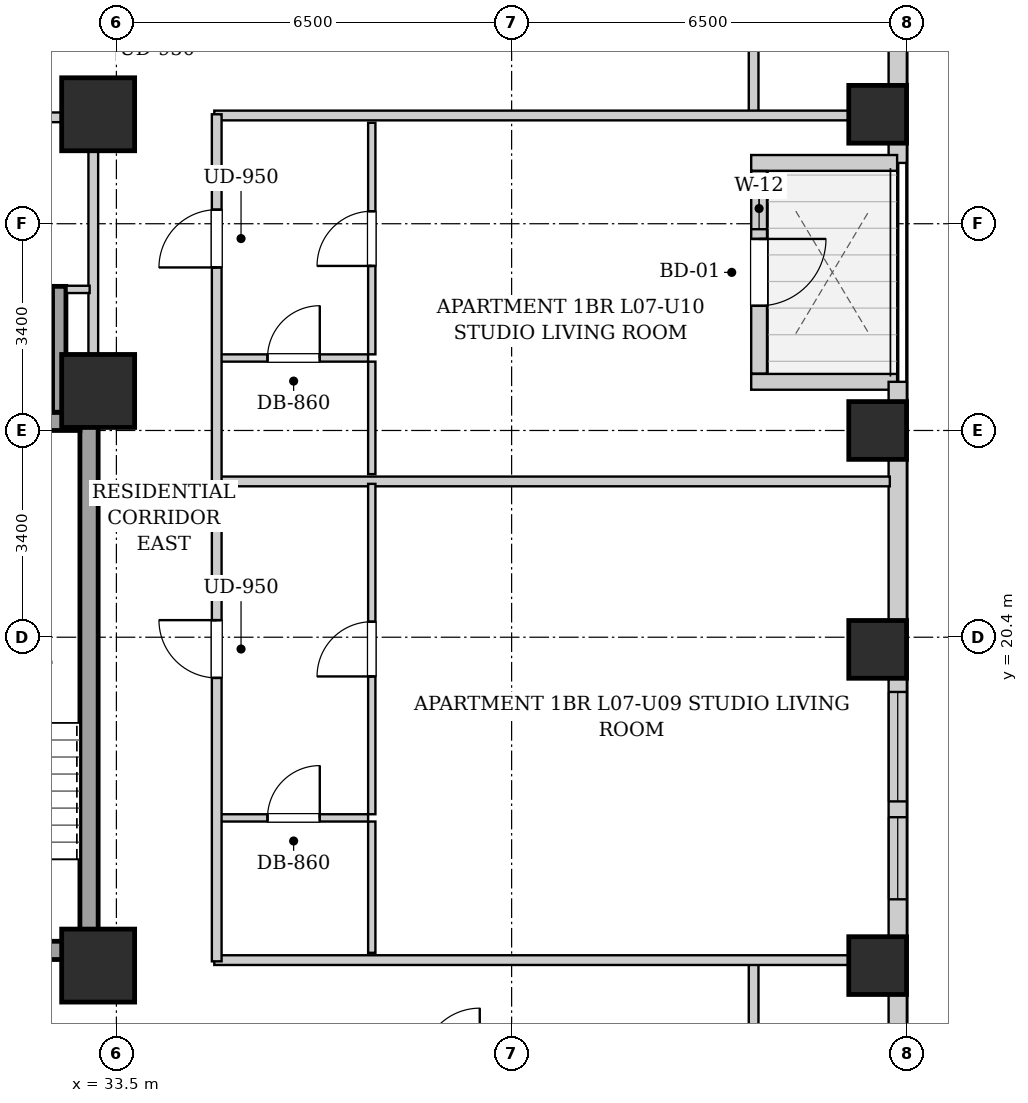
"""IFC4 building model, lengths in metres.
Left out: names, types, materials, properties, quantities, classifications, styles, units other than length and angle.
Written with IfcOpenShell. Run it as: python <this file> out.ifc"""

import sys

from ifc_helpers import new_model, si_unit, direction, frame, frame_2d, origin, origin_2d, place, context, subcontext, project, spatial, rectangle, extrude, element, fill, save


model = new_model("IFC4")
c1 = context("Model", 3, precision=1e-05, world=origin(), true_north=direction((0.0, 1.0)))
c2 = subcontext(c1, "Body", "Model", "MODEL_VIEW")
j1 = project(units=[si_unit("LENGTHUNIT", "METRE"), si_unit("PLANEANGLEUNIT", "RADIAN")], contexts=[c1])
p1 = place(None, origin())
s1 = spatial("IfcSite", under=j1, at=p1, CompositionType="ELEMENT")
p2 = place(p1, origin())
s2 = spatial("IfcBuilding", under=s1, at=p2, CompositionType="ELEMENT")
p3 = place(p2, frame((0.0, 0.0, 32.2)))
s3 = spatial("IfcBuildingStorey", under=s2, at=p3, CompositionType="ELEMENT", Elevation=32.2)
for number, where, z_axis, x_axis in (
    (1, (46.02, 15.0, 0.0), (0.0, 0.0, 1.0), (1.0, 0.0, 0.0)),
    (2, (46.02, 20.2, 0.0), (0.0, 0.0, 1.0), (1.0, 0.0, 0.0)),
    (3, (46.02, 23.8, 0.0), (0.0, 0.0, 1.0), (1.0, 0.0, 0.0)),
    (4, (46.02, 29.0, 0.0), (0.0, 0.0, 1.0), (1.0, 0.0, 0.0)),
):
    element("IfcColumn", number, at=place(p3, frame(where, z_axis=z_axis, x_axis=x_axis)), inside=s3, PredefinedType="COLUMN", context=c2, shape_type="SweptSolid", body=[
        extrude(rectangle(XDim=0.95, YDim=0.95, at=origin_2d()), origin(), (0.0, 0.0, 1.0), 3.2),
    ])
for number, where, z_axis, x_axis in (
    (5, (33.2, 15.0, 0.0), (0.0, 0.0, 1.0), (1.0, 0.0, 0.0)),
    (6, (33.2, 29.0, 0.0), (0.0, 0.0, 1.0), (1.0, 0.0, 0.0)),
    (7, (33.2, 24.45, 0.0), (0.0, 0.0, 1.0), (1.0, 0.0, 0.0)),
):
    element("IfcColumn", number, at=place(p3, frame(where, z_axis=z_axis, x_axis=x_axis)), inside=s3, PredefinedType="COLUMN", context=c2, shape_type="SweptSolid", body=[
        extrude(rectangle(XDim=1.2, YDim=1.2, at=origin_2d()), origin(), (0.0, 0.0, 1.0), 3.2),
    ])
p4 = place(p3, frame((46.35, 45.1, 0.0), z_axis=(0.0, 0.0, 1.0), x_axis=(0.0, -1.0, 0.0)))
e8 = element("IfcWall", 8, at=p4, inside=s3, PredefinedType="SOLIDWALL", context=c2, shape_type="SweptSolid", body=[
    extrude(rectangle(XDim=16.9, YDim=0.3, at=frame_2d((8.45, 0.0))), origin(), (0.0, 0.0, 1.0), 1.975),
])
p5 = place(p4, frame((3.665, 0.0, 0.55)))
e9 = element("IfcOpeningElement", 9, at=p5, cuts=e8, PredefinedType="OPENING", context=c2, shape_type="SweptSolid", body=[
    extrude(rectangle(XDim=1.8, YDim=1.2, at=frame_2d((0.9, 0.6))), frame((0.0, 0.16, 0.0), z_axis=(0.0, -1.0, 0.0), x_axis=(1.0, 0.0, 0.0)), (0.0, 0.0, 1.0), 0.32),
])
p6 = place(p4, frame((1.185, 0.0, 0.55)))
e10 = element("IfcOpeningElement", 10, at=p6, cuts=e8, PredefinedType="OPENING", context=c2, shape_type="SweptSolid", body=[
    extrude(rectangle(XDim=1.35, YDim=1.2, at=frame_2d((0.675, 0.6))), frame((0.0, 0.16, 0.0), z_axis=(0.0, -1.0, 0.0), x_axis=(1.0, 0.0, 0.0)), (0.0, 0.0, 1.0), 0.32),
])
p7 = place(p3, frame((46.34, 28.2, 0.0), z_axis=(0.0, 0.0, 1.0), x_axis=(-1.0, 0.0, 0.0)))
e11 = element("IfcWall", 11, at=p7, inside=s3, PredefinedType="SOLIDWALL", context=c2, shape_type="SweptSolid", body=[
    extrude(rectangle(XDim=2.4, YDim=0.26, at=frame_2d((1.2, 0.0))), origin(), (0.0, 0.0, 1.0), 2.94),
])
p8 = place(p3, frame((44.07, 28.066, 0.0), z_axis=(0.0, 0.0, 1.0), x_axis=(0.0, -1.0, 0.0)))
e12 = element("IfcWall", 12, at=p8, inside=s3, PredefinedType="SOLIDWALL", context=c2, shape_type="SweptSolid", body=[
    extrude(rectangle(XDim=3.332, YDim=0.26, at=frame_2d((1.666, 0.0))), origin(), (0.0, 0.0, 1.0), 2.94),
])
p9 = place(p8, frame((1.116, 0.0, 0.0)))
e13 = element("IfcOpeningElement", 13, at=p9, cuts=e12, PredefinedType="OPENING", context=c2, shape_type="SweptSolid", body=[
    extrude(rectangle(XDim=1.1, YDim=2.0, at=frame_2d((0.55, 1.0))), frame((0.0, 0.14, 0.0), z_axis=(0.0, -1.0, 0.0), x_axis=(1.0, 0.0, 0.0)), (0.0, 0.0, 1.0), 0.28),
])
p10 = place(p8, frame((0.276, 0.0, 0.55)))
e14 = element("IfcOpeningElement", 14, at=p10, cuts=e12, PredefinedType="OPENING", context=c2, shape_type="SweptSolid", body=[
    extrude(rectangle(XDim=0.68, YDim=1.2, at=frame_2d((0.34, 0.6))), frame((0.0, 0.14, 0.0), z_axis=(0.0, -1.0, 0.0), x_axis=(1.0, 0.0, 0.0)), (0.0, 0.0, 1.0), 0.28),
])
p11 = place(p3, frame((43.94, 24.6, 0.0), z_axis=(0.0, 0.0, 1.0), x_axis=(1.0, 0.0, 0.0)))
e15 = element("IfcWall", 15, at=p11, inside=s3, PredefinedType="SOLIDWALL", context=c2, shape_type="SweptSolid", body=[
    extrude(rectangle(XDim=2.4, YDim=0.26, at=frame_2d((1.2, 0.0))), origin(), (0.0, 0.0, 1.0), 2.94),
])
p12 = place(p3, frame((46.35, 24.6, 0.0), z_axis=(0.0, 0.0, 1.0), x_axis=(0.0, -1.0, 0.0)))
e16 = element("IfcWall", 16, at=p12, inside=s3, PredefinedType="SOLIDWALL", context=c2, shape_type="SweptSolid", body=[
    extrude(rectangle(XDim=22.1, YDim=0.3, at=frame_2d((11.05, 0.0))), origin(), (0.0, 0.0, 1.0), 1.975),
])
p13 = place(p12, frame((17.141, 0.0, 0.55)))
e17 = element("IfcOpeningElement", 17, at=p13, cuts=e16, PredefinedType="OPENING", context=c2, shape_type="SweptSolid", body=[
    extrude(rectangle(XDim=1.8, YDim=1.2, at=frame_2d((0.9, 0.6))), frame((0.0, 0.16, 0.0), z_axis=(0.0, -1.0, 0.0), x_axis=(1.0, 0.0, 0.0)), (0.0, 0.0, 1.0), 0.32),
])
p14 = place(p12, frame((14.415, 0.0, 0.55)))
e18 = element("IfcOpeningElement", 18, at=p14, cuts=e16, PredefinedType="OPENING", context=c2, shape_type="SweptSolid", body=[
    extrude(rectangle(XDim=1.35, YDim=1.2, at=frame_2d((0.675, 0.6))), frame((0.0, 0.16, 0.0), z_axis=(0.0, -1.0, 0.0), x_axis=(1.0, 0.0, 0.0)), (0.0, 0.0, 1.0), 0.32),
])
p15 = place(p12, frame((5.1, 0.0, 0.55)))
e19 = element("IfcOpeningElement", 19, at=p15, cuts=e16, PredefinedType="OPENING", context=c2, shape_type="SweptSolid", body=[
    extrude(rectangle(XDim=1.8, YDim=1.2, at=frame_2d((0.9, 0.6))), frame((0.0, 0.16, 0.0), z_axis=(0.0, -1.0, 0.0), x_axis=(1.0, 0.0, 0.0)), (0.0, 0.0, 1.0), 0.32),
])
p16 = place(p12, frame((7.16, 0.0, 0.55)))
e20 = element("IfcOpeningElement", 20, at=p16, cuts=e16, PredefinedType="OPENING", context=c2, shape_type="SweptSolid", body=[
    extrude(rectangle(XDim=1.35, YDim=1.2, at=frame_2d((0.675, 0.6))), frame((0.0, 0.16, 0.0), z_axis=(0.0, -1.0, 0.0), x_axis=(1.0, 0.0, 0.0)), (0.0, 0.0, 1.0), 0.32),
])
p17 = place(p3, frame((33.05, 15.1, 0.0), z_axis=(0.0, 0.0, 1.0), x_axis=(0.0, 1.0, 0.0)))
e21 = element("IfcWall", 21, at=p17, inside=s3, PredefinedType="SHEAR", context=c2, shape_type="SweptSolid", body=[
    extrude(rectangle(XDim=9.0, YDim=0.3, at=frame_2d((4.5, 0.0))), origin(), (0.0, 0.0, 1.0), 2.94),
])
p18 = place(p3, frame((30.05, 23.95, 0.0), z_axis=(0.0, 0.0, 1.0), x_axis=(1.0, 0.0, 0.0)))
e22 = element("IfcWall", 22, at=p18, inside=s3, PredefinedType="SHEAR", context=c2, shape_type="SweptSolid", body=[
    extrude(rectangle(XDim=2.85, YDim=0.3, at=frame_2d((1.425, 0.0))), origin(), (0.0, 0.0, 1.0), 2.94),
])
p19 = place(p3, frame((30.05, 15.25, 0.0), z_axis=(0.0, 0.0, 1.0), x_axis=(1.0, 0.0, 0.0)))
e23 = element("IfcWall", 23, at=p19, inside=s3, PredefinedType="SHEAR", context=c2, shape_type="SweptSolid", body=[
    extrude(rectangle(XDim=2.85, YDim=0.3, at=frame_2d((1.425, 0.0))), origin(), (0.0, 0.0, 1.0), 2.94),
])
p20 = place(p19, frame((0.86, 0.0, 0.0)))
e24 = element("IfcOpeningElement", 24, at=p20, cuts=e23, PredefinedType="OPENING", context=c2, shape_type="SweptSolid", body=[
    extrude(rectangle(XDim=1.1, YDim=2.05, at=frame_2d((0.55, 1.025))), frame((0.0, 0.16, 0.0), z_axis=(0.0, -1.0, 0.0), x_axis=(1.0, 0.0, 0.0)), (0.0, 0.0, 1.0), 0.32),
])
p21 = place(p3, frame((32.56, 24.1, 0.0), z_axis=(0.0, 0.0, 1.0), x_axis=(0.0, 1.0, 0.0)))
e25 = element("IfcWall", 25, at=p21, inside=s3, PredefinedType="SHEAR", context=c2, shape_type="SweptSolid", body=[
    extrude(rectangle(XDim=2.07, YDim=0.22, at=frame_2d((1.035, 0.0))), origin(), (0.0, 0.0, 1.0), 2.94),
])
p22 = place(p3, frame((33.12, 24.12, 0.0), z_axis=(0.0, 0.0, 1.0), x_axis=(0.0, 1.0, 0.0)))
e26 = element("IfcWall", 26, at=p22, inside=s3, PredefinedType="PARTITIONING", context=c2, shape_type="SweptSolid", body=[
    extrude(rectangle(XDim=4.76, YDim=0.16, at=frame_2d((2.38, 0.0))), origin(), (0.0, 0.0, 1.0), 2.94),
])
p23 = place(p3, frame((32.68, 26.12, 0.0), z_axis=(0.0, 0.0, 1.0), x_axis=(1.0, 0.0, 0.0)))
e27 = element("IfcWall", 27, at=p23, inside=s3, PredefinedType="PARTITIONING", context=c2, shape_type="SweptSolid", body=[
    extrude(rectangle(XDim=0.38, YDim=0.12, at=frame_2d((0.19, 0.0))), origin(), (0.0, 0.0, 1.0), 2.94),
])
p24 = place(p3, frame((30.08, 28.95, 0.0), z_axis=(0.0, 0.0, 1.0), x_axis=(1.0, 0.0, 0.0)))
e28 = element("IfcWall", 28, at=p24, inside=s3, PredefinedType="PARTITIONING", context=c2, shape_type="SweptSolid", body=[
    extrude(rectangle(XDim=2.96, YDim=0.16, at=frame_2d((1.48, 0.0))), origin(), (0.0, 0.0, 1.0), 2.94),
])
p25 = place(p24, frame((0.695, 0.0, 0.0)))
e29 = element("IfcOpeningElement", 29, at=p25, cuts=e28, PredefinedType="OPENING", context=c2, shape_type="SweptSolid", body=[
    extrude(rectangle(XDim=0.86, YDim=2.05, at=frame_2d((0.43, 1.025))), frame((0.0, 0.09, 0.0), z_axis=(0.0, -1.0, 0.0), x_axis=(1.0, 0.0, 0.0)), (0.0, 0.0, 1.0), 0.18),
])
for number, where, z_axis, x_axis in (
    (30, (43.98, 13.35, 0.0), (0.0, 0.0, 1.0), (0.0, 1.0, 0.0)),
    (31, (43.98, 28.98, 0.0), (0.0, 0.0, 1.0), (0.0, 1.0, 0.0)),
):
    element("IfcWall", number, at=place(p3, frame(where, z_axis=z_axis, x_axis=x_axis)), inside=s3, PredefinedType="PARTITIONING", context=c2, shape_type="SweptSolid", body=[
        extrude(rectangle(XDim=1.74, YDim=0.16, at=frame_2d((0.87, 0.0))), origin(), (0.0, 0.0, 1.0), 2.94),
    ])
for number, where, z_axis, x_axis in (
    (32, (35.11, 15.09, 0.0), (0.0, 0.0, 1.0), (1.0, 0.0, 0.0)),
    (33, (35.11, 28.98, 0.0), (0.0, 0.0, 1.0), (1.0, 0.0, 0.0)),
):
    element("IfcWall", number, at=place(p3, frame(where, z_axis=z_axis, x_axis=x_axis)), inside=s3, PredefinedType="PARTITIONING", context=c2, shape_type="SweptSolid", body=[
        extrude(rectangle(XDim=11.11, YDim=0.16, at=frame_2d((5.555, 0.0))), origin(), (0.0, 0.0, 1.0), 2.155),
    ])
p26 = place(p3, frame((35.19, 22.962, 0.0), z_axis=(0.0, 0.0, 1.0), x_axis=(1.0, 0.0, 0.0)))
e34 = element("IfcWall", 34, at=p26, inside=s3, PredefinedType="PARTITIONING", context=c2, shape_type="SweptSolid", body=[
    extrude(rectangle(XDim=11.03, YDim=0.16, at=frame_2d((5.515, 0.0))), origin(), (0.0, 0.0, 1.0), 2.94),
])
p27 = place(p3, frame((35.19, 17.429, 0.0), z_axis=(0.0, 0.0, 1.0), x_axis=(1.0, 0.0, 0.0)))
e35 = element("IfcWall", 35, at=p27, inside=s3, PredefinedType="PARTITIONING", context=c2, shape_type="SweptSolid", body=[
    extrude(rectangle(XDim=2.45, YDim=0.12, at=frame_2d((1.225, 0.0))), origin(), (0.0, 0.0, 1.0), 2.94),
])
p28 = place(p27, frame((0.795, 0.0, 0.0)))
e36 = element("IfcOpeningElement", 36, at=p28, cuts=e35, PredefinedType="OPENING", context=c2, shape_type="SweptSolid", body=[
    extrude(rectangle(XDim=0.86, YDim=2.05, at=frame_2d((0.43, 1.025))), frame((0.0, 0.07, 0.0), z_axis=(0.0, -1.0, 0.0), x_axis=(1.0, 0.0, 0.0)), (0.0, 0.0, 1.0), 0.14),
])
p29 = place(p3, frame((37.7, 15.21, 0.0), z_axis=(0.0, 0.0, 1.0), x_axis=(0.0, 1.0, 0.0)))
e37 = element("IfcWall", 37, at=p29, inside=s3, PredefinedType="PARTITIONING", context=c2, shape_type="SweptSolid", body=[
    extrude(rectangle(XDim=2.159, YDim=0.12, at=frame_2d((1.08, 0.0))), origin(), (0.0, 0.0, 1.0), 2.94),
])
p30 = place(p3, frame((37.7, 17.489, 0.0), z_axis=(0.0, 0.0, 1.0), x_axis=(0.0, 1.0, 0.0)))
e38 = element("IfcWall", 38, at=p30, inside=s3, PredefinedType="PARTITIONING", context=c2, shape_type="SweptSolid", body=[
    extrude(rectangle(XDim=5.433, YDim=0.12, at=frame_2d((2.717, 0.0))), origin(), (0.0, 0.0, 1.0), 2.94),
])
p31 = place(p30, frame((2.266, 0.0, 0.0)))
e39 = element("IfcOpeningElement", 39, at=p31, cuts=e38, PredefinedType="OPENING", context=c2, shape_type="SweptSolid", body=[
    extrude(rectangle(XDim=0.9, YDim=2.05, at=frame_2d((0.45, 1.025))), frame((0.0, 0.07, 0.0), z_axis=(0.0, -1.0, 0.0), x_axis=(1.0, 0.0, 0.0)), (0.0, 0.0, 1.0), 0.14),
])
p32 = place(p3, frame((35.19, 24.992, 0.0), z_axis=(0.0, 0.0, 1.0), x_axis=(1.0, 0.0, 0.0)))
e40 = element("IfcWall", 40, at=p32, inside=s3, PredefinedType="PARTITIONING", context=c2, shape_type="SweptSolid", body=[
    extrude(rectangle(XDim=2.45, YDim=0.12, at=frame_2d((1.225, 0.0))), origin(), (0.0, 0.0, 1.0), 2.94),
])
p33 = place(p32, frame((0.795, 0.0, 0.0)))
e41 = element("IfcOpeningElement", 41, at=p33, cuts=e40, PredefinedType="OPENING", context=c2, shape_type="SweptSolid", body=[
    extrude(rectangle(XDim=0.86, YDim=2.05, at=frame_2d((0.43, 1.025))), frame((0.0, 0.07, 0.0), z_axis=(0.0, -1.0, 0.0), x_axis=(1.0, 0.0, 0.0)), (0.0, 0.0, 1.0), 0.14),
])
p34 = place(p3, frame((37.7, 23.082, 0.0), z_axis=(0.0, 0.0, 1.0), x_axis=(0.0, 1.0, 0.0)))
e42 = element("IfcWall", 42, at=p34, inside=s3, PredefinedType="PARTITIONING", context=c2, shape_type="SweptSolid", body=[
    extrude(rectangle(XDim=1.85, YDim=0.12, at=frame_2d((0.925, 0.0))), origin(), (0.0, 0.0, 1.0), 2.94),
])
p35 = place(p3, frame((37.7, 25.052, 0.0), z_axis=(0.0, 0.0, 1.0), x_axis=(0.0, 1.0, 0.0)))
e43 = element("IfcWall", 43, at=p35, inside=s3, PredefinedType="PARTITIONING", context=c2, shape_type="SweptSolid", body=[
    extrude(rectangle(XDim=3.808, YDim=0.12, at=frame_2d((1.904, 0.0))), origin(), (0.0, 0.0, 1.0), 2.94),
])
p36 = place(p35, frame((1.454, 0.0, 0.0)))
e44 = element("IfcOpeningElement", 44, at=p36, cuts=e43, PredefinedType="OPENING", context=c2, shape_type="SweptSolid", body=[
    extrude(rectangle(XDim=0.9, YDim=2.05, at=frame_2d((0.45, 1.025))), frame((0.0, 0.07, 0.0), z_axis=(0.0, -1.0, 0.0), x_axis=(1.0, 0.0, 0.0)), (0.0, 0.0, 1.0), 0.14),
])
p37 = place(p3, frame((35.15, 15.07, 0.0), z_axis=(0.0, 0.0, 1.0), x_axis=(0.0, 1.0, 0.0)))
e45 = element("IfcWall", 45, at=p37, inside=s3, PredefinedType="PARTITIONING", context=c2, shape_type="SweptSolid", body=[
    extrude(rectangle(XDim=13.93, YDim=0.16, at=frame_2d((6.965, 0.0))), origin(), (0.0, 0.0, 1.0), 2.94),
])
p38 = place(p37, frame((4.661, 0.0, 0.0)))
e46 = element("IfcOpeningElement", 46, at=p38, cuts=e45, PredefinedType="OPENING", context=c2, shape_type="SweptSolid", body=[
    extrude(rectangle(XDim=0.95, YDim=2.1, at=frame_2d((0.475, 1.05))), frame((0.0, 0.09, 0.0), z_axis=(0.0, -1.0, 0.0), x_axis=(1.0, 0.0, 0.0)), (0.0, 0.0, 1.0), 0.18),
])
p39 = place(p37, frame((11.411, 0.0, 0.0)))
e47 = element("IfcOpeningElement", 47, at=p39, cuts=e45, PredefinedType="OPENING", context=c2, shape_type="SweptSolid", body=[
    extrude(rectangle(XDim=0.95, YDim=2.1, at=frame_2d((0.475, 1.05))), frame((0.0, 0.09, 0.0), z_axis=(0.0, -1.0, 0.0), x_axis=(1.0, 0.0, 0.0)), (0.0, 0.0, 1.0), 0.18),
])
p40 = place(p28, origin())
e48 = element("IfcDoor", 48, at=p40, inside=s3, OperationType="SINGLE_SWING_RIGHT", PredefinedType="DOOR", context=c2, shape_type="SweptSolid", body=[
    extrude(rectangle(XDim=0.86, YDim=2.05, at=frame_2d((0.43, 1.025))), frame((0.0, 0.025, 0.0), z_axis=(0.0, -1.0, 0.0), x_axis=(1.0, 0.0, 0.0)), (0.0, 0.0, 1.0), 0.05),
])
fill(e36, e48)
p41 = place(p31, origin())
e49 = element("IfcDoor", 49, at=p41, inside=s3, OperationType="SINGLE_SWING_LEFT", PredefinedType="DOOR", context=c2, shape_type="SweptSolid", body=[
    extrude(rectangle(XDim=0.9, YDim=2.05, at=frame_2d((0.45, 1.025))), frame((0.0, 0.025, 0.0), z_axis=(0.0, -1.0, 0.0), x_axis=(1.0, 0.0, 0.0)), (0.0, 0.0, 1.0), 0.05),
])
fill(e39, e49)
p42 = place(p33, origin())
e50 = element("IfcDoor", 50, at=p42, inside=s3, OperationType="SINGLE_SWING_RIGHT", PredefinedType="DOOR", context=c2, shape_type="SweptSolid", body=[
    extrude(rectangle(XDim=0.86, YDim=2.05, at=frame_2d((0.43, 1.025))), frame((0.0, 0.025, 0.0), z_axis=(0.0, -1.0, 0.0), x_axis=(1.0, 0.0, 0.0)), (0.0, 0.0, 1.0), 0.05),
])
fill(e41, e50)
p43 = place(p36, origin())
e51 = element("IfcDoor", 51, at=p43, inside=s3, OperationType="SINGLE_SWING_LEFT", PredefinedType="DOOR", context=c2, shape_type="SweptSolid", body=[
    extrude(rectangle(XDim=0.9, YDim=2.05, at=frame_2d((0.45, 1.025))), frame((0.0, 0.025, 0.0), z_axis=(0.0, -1.0, 0.0), x_axis=(1.0, 0.0, 0.0)), (0.0, 0.0, 1.0), 0.05),
])
fill(e44, e51)
p44 = place(p38, origin())
e52 = element("IfcDoor", 52, at=p44, inside=s3, OperationType="SINGLE_SWING_RIGHT", PredefinedType="DOOR", context=c2, shape_type="SweptSolid", body=[
    extrude(rectangle(XDim=0.95, YDim=2.1, at=frame_2d((0.475, 1.05))), frame((0.0, 0.025, 0.0), z_axis=(0.0, -1.0, 0.0), x_axis=(1.0, 0.0, 0.0)), (0.0, 0.0, 1.0), 0.05),
])
fill(e46, e52)
p45 = place(p39, origin())
e53 = element("IfcDoor", 53, at=p45, inside=s3, OperationType="SINGLE_SWING_LEFT", PredefinedType="DOOR", context=c2, shape_type="SweptSolid", body=[
    extrude(rectangle(XDim=0.95, YDim=2.1, at=frame_2d((0.475, 1.05))), frame((0.0, 0.025, 0.0), z_axis=(0.0, -1.0, 0.0), x_axis=(1.0, 0.0, 0.0)), (0.0, 0.0, 1.0), 0.05),
])
fill(e47, e53)
p46 = place(p9, origin())
e54 = element("IfcDoor", 54, at=p46, inside=s3, OperationType="SINGLE_SWING_LEFT", PredefinedType="DOOR", context=c2, shape_type="SweptSolid", body=[
    extrude(rectangle(XDim=1.1, YDim=2.0, at=frame_2d((0.55, 1.0))), frame((0.0, 0.025, 0.0), z_axis=(0.0, -1.0, 0.0), x_axis=(1.0, 0.0, 0.0)), (0.0, 0.0, 1.0), 0.05),
])
fill(e13, e54)
p47 = place(p15, origin())
e55 = element("IfcWindow", 55, at=p47, inside=s3, PartitioningType="DOUBLE_PANEL_VERTICAL", PredefinedType="WINDOW", context=c2, shape_type="SweptSolid", body=[
    extrude(rectangle(XDim=1.8, YDim=1.2, at=frame_2d((0.9, 0.6))), frame((0.0, 0.03, 0.0), z_axis=(0.0, -1.0, 0.0), x_axis=(1.0, 0.0, 0.0)), (0.0, 0.0, 1.0), 0.06),
])
fill(e19, e55)
p48 = place(p16, origin())
e56 = element("IfcWindow", 56, at=p48, inside=s3, PartitioningType="SINGLE_PANEL", PredefinedType="WINDOW", context=c2, shape_type="SweptSolid", body=[
    extrude(rectangle(XDim=1.35, YDim=1.2, at=frame_2d((0.675, 0.6))), frame((0.0, 0.03, 0.0), z_axis=(0.0, -1.0, 0.0), x_axis=(1.0, 0.0, 0.0)), (0.0, 0.0, 1.0), 0.06),
])
fill(e20, e56)
p49 = place(p10, origin())
e57 = element("IfcWindow", 57, at=p49, inside=s3, PartitioningType="SINGLE_PANEL", PredefinedType="WINDOW", context=c2, shape_type="SweptSolid", body=[
    extrude(rectangle(XDim=0.68, YDim=1.2, at=frame_2d((0.34, 0.6))), frame((0.0, 0.03, 0.0), z_axis=(0.0, -1.0, 0.0), x_axis=(1.0, 0.0, 0.0)), (0.0, 0.0, 1.0), 0.06),
])
fill(e14, e57)
save(model, sys.argv[1])
